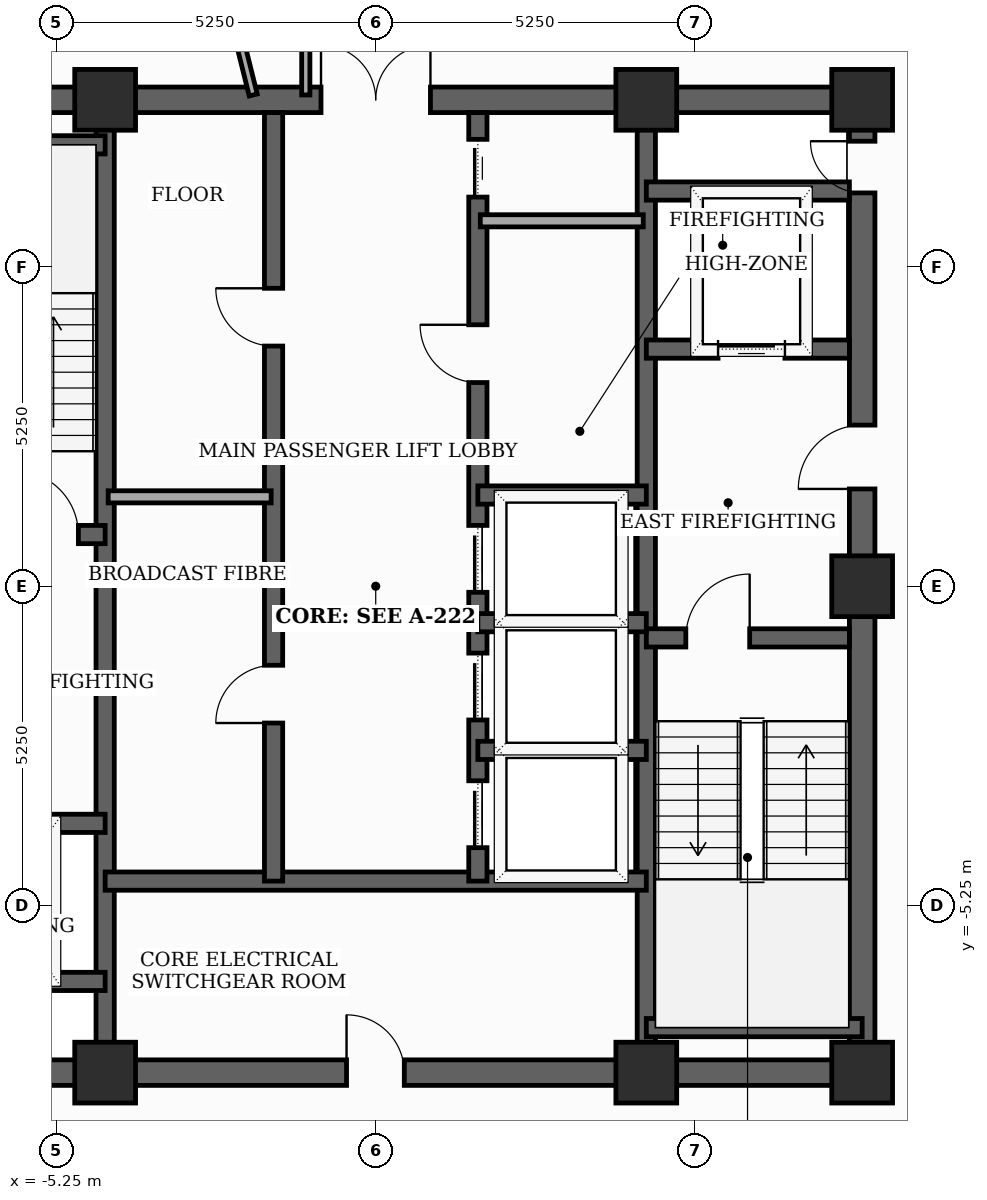
"""IFC4 building model, lengths in metres.
Left out: names, types, materials, properties, quantities, classifications, styles, units other than length and angle.
Written with IfcOpenShell. Run it as: python <this file> out.ifc"""

import sys

from ifc_helpers import new_model, si_unit, direction, frame, frame_2d, origin, origin_2d, place, context, subcontext, project, spatial, rectangle, extrude, element, fill, save


model = new_model("IFC4")
c1 = context("Model", 3, precision=1e-05, world=origin(), true_north=direction((0.0, 1.0)))
c2 = subcontext(c1, "Body", "Model", "MODEL_VIEW")
j1 = project(units=[si_unit("LENGTHUNIT", "METRE"), si_unit("PLANEANGLEUNIT", "RADIAN")], contexts=[c1])
p1 = place(None, origin())
s1 = spatial("IfcSite", under=j1, at=p1, CompositionType="ELEMENT")
p2 = place(p1, origin())
s2 = spatial("IfcBuilding", under=s1, at=p2, CompositionType="ELEMENT")
p3 = place(p2, frame((0.0, 0.0, 286.9)))
s3 = spatial("IfcBuildingStorey", under=s2, at=p3, CompositionType="ELEMENT", Elevation=286.9)
for number, where, z_axis, x_axis in (
    (1, (-4.45, -8.0, 0.0), (0.0, 0.0, 1.0), (1.0, 0.0, 0.0)),
    (2, (4.45, -8.0, 0.0), (0.0, 0.0, 1.0), (1.0, 0.0, 0.0)),
    (3, (8.0, -8.0, 0.0), (0.0, 0.0, 1.0), (1.0, 0.0, 0.0)),
    (4, (8.0, 0.0, 0.0), (0.0, 0.0, 1.0), (1.0, 0.0, 0.0)),
    (5, (8.0, 8.0, 0.0), (0.0, 0.0, 1.0), (1.0, 0.0, 0.0)),
    (6, (4.45, 8.0, 0.0), (0.0, 0.0, 1.0), (1.0, 0.0, 0.0)),
    (7, (-4.45, 8.0, 0.0), (0.0, 0.0, 1.0), (1.0, 0.0, 0.0)),
):
    element("IfcColumn", number, at=place(p3, frame(where, z_axis=z_axis, x_axis=x_axis)), inside=s3, PredefinedType="COLUMN", context=c2, shape_type="SweptSolid", body=[
        extrude(rectangle(XDim=1.0, YDim=1.0, at=origin_2d()), origin(), (0.0, 0.0, 1.0), 3.7),
    ])
p4 = place(p3, frame((8.0, -8.0, 0.0), z_axis=(0.0, 0.0, 1.0), x_axis=(0.0, 1.0, 0.0)))
e8 = element("IfcWall", 8, at=p4, inside=s3, PredefinedType="SHEAR", context=c2, shape_type="SweptSolid", body=[
    extrude(rectangle(XDim=16.0, YDim=0.42, at=frame_2d((8.0, 0.0))), origin(), (0.0, 0.0, 1.0), 3.5),
])
p5 = place(p4, frame((9.6, 0.0, 0.0)))
e9 = element("IfcOpeningElement", 9, at=p5, cuts=e8, PredefinedType="OPENING", context=c2, shape_type="SweptSolid", body=[
    extrude(rectangle(XDim=1.05, YDim=2.15, at=frame_2d((0.525, 1.075))), frame((0.0, 0.22, 0.0), z_axis=(0.0, -1.0, 0.0), x_axis=(1.0, 0.0, 0.0)), (0.0, 0.0, 1.0), 0.44),
])
p6 = place(p4, frame((14.469, 0.0, 0.0)))
e10 = element("IfcOpeningElement", 10, at=p6, cuts=e8, PredefinedType="OPENING", context=c2, shape_type="SweptSolid", body=[
    extrude(rectangle(XDim=0.85, YDim=2.02, at=frame_2d((0.425, 1.01))), frame((0.0, 0.22, 0.0), z_axis=(0.0, -1.0, 0.0), x_axis=(1.0, 0.0, 0.0)), (0.0, 0.0, 1.0), 0.44),
])
p7 = place(p3, frame((-8.0, -8.0, 0.0), z_axis=(0.0, 0.0, 1.0), x_axis=(1.0, 0.0, 0.0)))
e11 = element("IfcWall", 11, at=p7, inside=s3, PredefinedType="SHEAR", context=c2, shape_type="SweptSolid", body=[
    extrude(rectangle(XDim=16.0, YDim=0.42, at=frame_2d((8.0, 0.0))), origin(), (0.0, 0.0, 1.0), 3.5),
])
p8 = place(p7, frame((7.52, 0.0, 0.0)))
e12 = element("IfcOpeningElement", 12, at=p8, cuts=e11, PredefinedType="OPENING", context=c2, shape_type="SweptSolid", body=[
    extrude(rectangle(XDim=0.95, YDim=2.1, at=frame_2d((0.475, 1.05))), frame((0.0, 0.22, 0.0), z_axis=(0.0, -1.0, 0.0), x_axis=(1.0, 0.0, 0.0)), (0.0, 0.0, 1.0), 0.44),
])
p9 = place(p3, frame((-8.0, 8.0, 0.0), z_axis=(0.0, 0.0, 1.0), x_axis=(1.0, 0.0, 0.0)))
e13 = element("IfcWall", 13, at=p9, inside=s3, PredefinedType="SHEAR", context=c2, shape_type="SweptSolid", body=[
    extrude(rectangle(XDim=16.0, YDim=0.42, at=frame_2d((8.0, 0.0))), origin(), (0.0, 0.0, 1.0), 3.5),
])
p10 = place(p9, frame((7.1, 0.0, 0.0)))
e14 = element("IfcOpeningElement", 14, at=p10, cuts=e13, PredefinedType="OPENING", context=c2, shape_type="SweptSolid", body=[
    extrude(rectangle(XDim=1.8, YDim=2.15, at=frame_2d((0.9, 1.075))), frame((0.0, 0.22, 0.0), z_axis=(0.0, -1.0, 0.0), x_axis=(1.0, 0.0, 0.0)), (0.0, 0.0, 1.0), 0.44),
])
for number, where, z_axis, x_axis in (
    (15, (-4.45, -7.79, 0.0), (0.0, 0.0, 1.0), (0.0, 1.0, 0.0)),
    (16, (4.45, -7.79, 0.0), (0.0, 0.0, 1.0), (0.0, 1.0, 0.0)),
):
    element("IfcWall", number, at=place(p3, frame(where, z_axis=z_axis, x_axis=x_axis)), inside=s3, PredefinedType="SHEAR", context=c2, shape_type="SweptSolid", body=[
        extrude(rectangle(XDim=15.58, YDim=0.3, at=frame_2d((7.79, 0.0))), origin(), (0.0, 0.0, 1.0), 3.5),
    ])
p11 = place(p3, frame((-7.79, 0.85, 0.0), z_axis=(0.0, 0.0, 1.0), x_axis=(1.0, 0.0, 0.0)))
e17 = element("IfcWall", 17, at=p11, inside=s3, PredefinedType="SHEAR", context=c2, shape_type="SweptSolid", body=[
    extrude(rectangle(XDim=3.34, YDim=0.3, at=frame_2d((1.67, 0.0))), origin(), (0.0, 0.0, 1.0), 3.5),
])
p12 = place(p11, frame((1.85, 0.0, 0.0)))
e18 = element("IfcOpeningElement", 18, at=p12, cuts=e17, PredefinedType="OPENING", context=c2, shape_type="SweptSolid", body=[
    extrude(rectangle(XDim=1.05, YDim=2.15, at=frame_2d((0.525, 1.075))), frame((0.0, 0.16, 0.0), z_axis=(0.0, -1.0, 0.0), x_axis=(1.0, 0.0, 0.0)), (0.0, 0.0, 1.0), 0.32),
])
p13 = place(p3, frame((-7.79, 7.26, 0.0), z_axis=(0.0, 0.0, 1.0), x_axis=(1.0, 0.0, 0.0)))
e19 = element("IfcWall", 19, at=p13, inside=s3, PredefinedType="SHEAR", context=c2, shape_type="SweptSolid", body=[
    extrude(rectangle(XDim=3.34, YDim=0.3, at=frame_2d((1.67, 0.0))), origin(), (0.0, 0.0, 1.0), 3.5),
])
p14 = place(p3, frame((4.45, -0.85, 0.0), z_axis=(0.0, 0.0, 1.0), x_axis=(1.0, 0.0, 0.0)))
e20 = element("IfcWall", 20, at=p14, inside=s3, PredefinedType="SHEAR", context=c2, shape_type="SweptSolid", body=[
    extrude(rectangle(XDim=3.34, YDim=0.3, at=frame_2d((1.67, 0.0))), origin(), (0.0, 0.0, 1.0), 3.5),
])
p15 = place(p14, frame((0.65, 0.0, 0.0)))
e21 = element("IfcOpeningElement", 21, at=p15, cuts=e20, PredefinedType="OPENING", context=c2, shape_type="SweptSolid", body=[
    extrude(rectangle(XDim=1.05, YDim=2.15, at=frame_2d((0.525, 1.075))), frame((0.0, 0.16, 0.0), z_axis=(0.0, -1.0, 0.0), x_axis=(1.0, 0.0, 0.0)), (0.0, 0.0, 1.0), 0.32),
])
p16 = place(p3, frame((4.45, -7.26, 0.0), z_axis=(0.0, 0.0, 1.0), x_axis=(1.0, 0.0, 0.0)))
e22 = element("IfcWall", 22, at=p16, inside=s3, PredefinedType="SHEAR", context=c2, shape_type="SweptSolid", body=[
    extrude(rectangle(XDim=3.55, YDim=0.3, at=frame_2d((1.775, 0.0))), origin(), (0.0, 0.0, 1.0), 3.5),
])
p17 = place(p3, frame((-7.79, -3.9, 0.0), z_axis=(0.0, 0.0, 1.0), x_axis=(1.0, 0.0, 0.0)))
e23 = element("IfcWall", 23, at=p17, inside=s3, PredefinedType="SHEAR", context=c2, shape_type="SweptSolid", body=[
    extrude(rectangle(XDim=3.34, YDim=0.3, at=frame_2d((1.67, 0.0))), origin(), (0.0, 0.0, 1.0), 3.5),
])
p18 = place(p17, frame((1.27, 0.0, 0.0)))
e24 = element("IfcOpeningElement", 24, at=p18, cuts=e23, PredefinedType="OPENING", context=c2, shape_type="SweptSolid", body=[
    extrude(rectangle(XDim=1.1, YDim=2.1, at=frame_2d((0.55, 1.05))), frame((0.0, 0.16, 0.0), z_axis=(0.0, -1.0, 0.0), x_axis=(1.0, 0.0, 0.0)), (0.0, 0.0, 1.0), 0.32),
])
p19 = place(p3, frame((-7.79, -6.5, 0.0), z_axis=(0.0, 0.0, 1.0), x_axis=(1.0, 0.0, 0.0)))
e25 = element("IfcWall", 25, at=p19, inside=s3, PredefinedType="SHEAR", context=c2, shape_type="SweptSolid", body=[
    extrude(rectangle(XDim=3.34, YDim=0.3, at=frame_2d((1.67, 0.0))), origin(), (0.0, 0.0, 1.0), 3.5),
])
p20 = place(p3, frame((4.45, 3.9, 0.0), z_axis=(0.0, 0.0, 1.0), x_axis=(1.0, 0.0, 0.0)))
e26 = element("IfcWall", 26, at=p20, inside=s3, PredefinedType="SHEAR", context=c2, shape_type="SweptSolid", body=[
    extrude(rectangle(XDim=3.34, YDim=0.3, at=frame_2d((1.67, 0.0))), origin(), (0.0, 0.0, 1.0), 3.5),
])
p21 = place(p20, frame((1.18, 0.0, 0.0)))
e27 = element("IfcOpeningElement", 27, at=p21, cuts=e26, PredefinedType="OPENING", context=c2, shape_type="SweptSolid", body=[
    extrude(rectangle(XDim=1.1, YDim=2.1, at=frame_2d((0.55, 1.05))), frame((0.0, 0.16, 0.0), z_axis=(0.0, -1.0, 0.0), x_axis=(1.0, 0.0, 0.0)), (0.0, 0.0, 1.0), 0.32),
])
p22 = place(p3, frame((4.45, 6.5, 0.0), z_axis=(0.0, 0.0, 1.0), x_axis=(1.0, 0.0, 0.0)))
e28 = element("IfcWall", 28, at=p22, inside=s3, PredefinedType="SHEAR", context=c2, shape_type="SweptSolid", body=[
    extrude(rectangle(XDim=3.34, YDim=0.3, at=frame_2d((1.67, 0.0))), origin(), (0.0, 0.0, 1.0), 3.5),
])
p23 = place(p3, frame((-4.45, -4.85, 0.0), z_axis=(0.0, 0.0, 1.0), x_axis=(1.0, 0.0, 0.0)))
e29 = element("IfcWall", 29, at=p23, inside=s3, PredefinedType="SHEAR", context=c2, shape_type="SweptSolid", body=[
    extrude(rectangle(XDim=8.9, YDim=0.3, at=frame_2d((4.45, 0.0))), origin(), (0.0, 0.0, 1.0), 3.5),
])
p24 = place(p3, frame((-1.68, -4.85, 0.0), z_axis=(0.0, 0.0, 1.0), x_axis=(0.0, 1.0, 0.0)))
e30 = element("IfcWall", 30, at=p24, inside=s3, PredefinedType="SHEAR", context=c2, shape_type="SweptSolid", body=[
    extrude(rectangle(XDim=12.64, YDim=0.3, at=frame_2d((6.32, 0.0))), origin(), (0.0, 0.0, 1.0), 3.5),
])
p25 = place(p24, frame((2.6, 0.0, 0.0)))
e31 = element("IfcOpeningElement", 31, at=p25, cuts=e30, PredefinedType="OPENING", context=c2, shape_type="SweptSolid", body=[
    extrude(rectangle(XDim=0.95, YDim=2.1, at=frame_2d((0.475, 1.05))), frame((0.0, 0.16, 0.0), z_axis=(0.0, -1.0, 0.0), x_axis=(1.0, 0.0, 0.0)), (0.0, 0.0, 1.0), 0.32),
])
p26 = place(p24, frame((8.8, 0.0, 0.0)))
e32 = element("IfcOpeningElement", 32, at=p26, cuts=e30, PredefinedType="OPENING", context=c2, shape_type="SweptSolid", body=[
    extrude(rectangle(XDim=0.95, YDim=2.1, at=frame_2d((0.475, 1.05))), frame((0.0, 0.16, 0.0), z_axis=(0.0, -1.0, 0.0), x_axis=(1.0, 0.0, 0.0)), (0.0, 0.0, 1.0), 0.32),
])
p27 = place(p3, frame((1.68, -4.85, 0.0), z_axis=(0.0, 0.0, 1.0), x_axis=(0.0, 1.0, 0.0)))
e33 = element("IfcWall", 33, at=p27, inside=s3, PredefinedType="SHEAR", context=c2, shape_type="SweptSolid", body=[
    extrude(rectangle(XDim=12.64, YDim=0.3, at=frame_2d((6.32, 0.0))), origin(), (0.0, 0.0, 1.0), 3.5),
])
p28 = place(p27, frame((0.55, 0.0, 0.0)))
e34 = element("IfcOpeningElement", 34, at=p28, cuts=e33, PredefinedType="OPENING", context=c2, shape_type="SweptSolid", body=[
    extrude(rectangle(XDim=1.1, YDim=2.1, at=frame_2d((0.55, 1.05))), frame((0.0, 0.16, 0.0), z_axis=(0.0, -1.0, 0.0), x_axis=(1.0, 0.0, 0.0)), (0.0, 0.0, 1.0), 0.32),
])
p29 = place(p27, frame((2.65, 0.0, 0.0)))
e35 = element("IfcOpeningElement", 35, at=p29, cuts=e33, PredefinedType="OPENING", context=c2, shape_type="SweptSolid", body=[
    extrude(rectangle(XDim=1.1, YDim=2.1, at=frame_2d((0.55, 1.05))), frame((0.0, 0.16, 0.0), z_axis=(0.0, -1.0, 0.0), x_axis=(1.0, 0.0, 0.0)), (0.0, 0.0, 1.0), 0.32),
])
p30 = place(p27, frame((4.75, 0.0, 0.0)))
e36 = element("IfcOpeningElement", 36, at=p30, cuts=e33, PredefinedType="OPENING", context=c2, shape_type="SweptSolid", body=[
    extrude(rectangle(XDim=1.1, YDim=2.1, at=frame_2d((0.55, 1.05))), frame((0.0, 0.16, 0.0), z_axis=(0.0, -1.0, 0.0), x_axis=(1.0, 0.0, 0.0)), (0.0, 0.0, 1.0), 0.32),
])
p31 = place(p27, frame((8.2, 0.0, 0.0)))
e37 = element("IfcOpeningElement", 37, at=p31, cuts=e33, PredefinedType="OPENING", context=c2, shape_type="SweptSolid", body=[
    extrude(rectangle(XDim=0.95, YDim=2.1, at=frame_2d((0.475, 1.05))), frame((0.0, 0.16, 0.0), z_axis=(0.0, -1.0, 0.0), x_axis=(1.0, 0.0, 0.0)), (0.0, 0.0, 1.0), 0.32),
])
p32 = place(p27, frame((11.25, 0.0, 0.0)))
e38 = element("IfcOpeningElement", 38, at=p32, cuts=e33, PredefinedType="OPENING", context=c2, shape_type="SweptSolid", body=[
    extrude(rectangle(XDim=0.95, YDim=2.1, at=frame_2d((0.475, 1.05))), frame((0.0, 0.16, 0.0), z_axis=(0.0, -1.0, 0.0), x_axis=(1.0, 0.0, 0.0)), (0.0, 0.0, 1.0), 0.32),
])
for number, where, z_axis, x_axis in (
    (39, (1.68, 1.5, 0.0), (0.0, 0.0, 1.0), (1.0, 0.0, 0.0)),
    (40, (1.68, -2.7, 0.0), (0.0, 0.0, 1.0), (1.0, 0.0, 0.0)),
    (41, (1.68, -0.6, 0.0), (0.0, 0.0, 1.0), (1.0, 0.0, 0.0)),
):
    element("IfcWall", number, at=place(p3, frame(where, z_axis=z_axis, x_axis=x_axis)), inside=s3, PredefinedType="SHEAR", context=c2, shape_type="SweptSolid", body=[
        extrude(rectangle(XDim=2.77, YDim=0.3, at=frame_2d((1.385, 0.0))), origin(), (0.0, 0.0, 1.0), 3.5),
    ])
for number, where, z_axis, x_axis in (
    (42, (-4.4, 1.47, 0.0), (0.0, 0.0, 1.0), (1.0, 0.0, 0.0)),
    (43, (1.72, 6.01, 0.0), (0.0, 0.0, 1.0), (1.0, 0.0, 0.0)),
):
    element("IfcWall", number, at=place(p3, frame(where, z_axis=z_axis, x_axis=x_axis)), inside=s3, PredefinedType="SOLIDWALL", context=c2, shape_type="SweptSolid", body=[
        extrude(rectangle(XDim=2.68, YDim=0.2, at=frame_2d((1.34, 0.0))), origin(), (0.0, 0.0, 1.0), 3.5),
    ])
p33 = place(p3, frame((-1.15, 10.65, 0.0), z_axis=(0.0, 0.0, 1.0), x_axis=(0.0, -1.0, 0.0)))
e44 = element("IfcWall", 44, at=p33, inside=s3, PredefinedType="PARTITIONING", context=c2, shape_type="SweptSolid", body=[
    extrude(rectangle(XDim=2.57, YDim=0.135, at=frame_2d((1.285, 0.0))), origin(), (0.0, 0.0, 1.0), 2.885),
])
p34 = place(p3, frame((-3.803, 15.255, 0.0), z_axis=(0.0, 0.0, 1.0), x_axis=(0.241851911951, -0.970313172479, 0.0)))
e45 = element("IfcWall", 45, at=p34, inside=s3, PredefinedType="PARTITIONING", context=c2, shape_type="SweptSolid", body=[
    extrude(rectangle(XDim=7.394, YDim=0.135, at=frame_2d((3.697, 0.0))), origin(), (0.0, 0.0, 1.0), 2.885),
])
p35 = place(p5, origin())
e46 = element("IfcDoor", 46, at=p35, inside=s3, OperationType="SINGLE_SWING_LEFT", PredefinedType="DOOR", context=c2, shape_type="SweptSolid", body=[
    extrude(rectangle(XDim=1.05, YDim=2.15, at=frame_2d((0.525, 1.075))), frame((0.0, 0.025, 0.0), z_axis=(0.0, -1.0, 0.0), x_axis=(1.0, 0.0, 0.0)), (0.0, 0.0, 1.0), 0.05),
])
fill(e9, e46)
p36 = place(p6, origin())
e47 = element("IfcDoor", 47, at=p36, inside=s3, OperationType="SINGLE_SWING_RIGHT", PredefinedType="TRAPDOOR", context=c2, shape_type="SweptSolid", body=[
    extrude(rectangle(XDim=0.85, YDim=2.02, at=frame_2d((0.425, 1.01))), frame((0.0, 0.025, 0.0), z_axis=(0.0, -1.0, 0.0), x_axis=(1.0, 0.0, 0.0)), (0.0, 0.0, 1.0), 0.05),
])
fill(e10, e47)
p37 = place(p8, origin())
e48 = element("IfcDoor", 48, at=p37, inside=s3, OperationType="SINGLE_SWING_LEFT", PredefinedType="DOOR", context=c2, shape_type="SweptSolid", body=[
    extrude(rectangle(XDim=0.95, YDim=2.1, at=frame_2d((0.475, 1.05))), frame((0.0, 0.025, 0.0), z_axis=(0.0, -1.0, 0.0), x_axis=(1.0, 0.0, 0.0)), (0.0, 0.0, 1.0), 0.05),
])
fill(e12, e48)
p38 = place(p10, origin())
e49 = element("IfcDoor", 49, at=p38, inside=s3, OperationType="DOUBLE_DOOR_SINGLE_SWING", PredefinedType="DOOR", context=c2, shape_type="SweptSolid", body=[
    extrude(rectangle(XDim=1.8, YDim=2.15, at=frame_2d((0.9, 1.075))), frame((0.0, 0.025, 0.0), z_axis=(0.0, -1.0, 0.0), x_axis=(1.0, 0.0, 0.0)), (0.0, 0.0, 1.0), 0.05),
])
fill(e14, e49)
p39 = place(p12, origin())
e50 = element("IfcDoor", 50, at=p39, inside=s3, OperationType="SINGLE_SWING_LEFT", PredefinedType="DOOR", context=c2, shape_type="SweptSolid", body=[
    extrude(rectangle(XDim=1.05, YDim=2.15, at=frame_2d((0.525, 1.075))), frame((0.0, 0.025, 0.0), z_axis=(0.0, -1.0, 0.0), x_axis=(1.0, 0.0, 0.0)), (0.0, 0.0, 1.0), 0.05),
])
fill(e18, e50)
p40 = place(p15, origin())
e51 = element("IfcDoor", 51, at=p40, inside=s3, OperationType="SINGLE_SWING_RIGHT", PredefinedType="DOOR", context=c2, shape_type="SweptSolid", body=[
    extrude(rectangle(XDim=1.05, YDim=2.15, at=frame_2d((0.525, 1.075))), frame((0.0, 0.025, 0.0), z_axis=(0.0, -1.0, 0.0), x_axis=(1.0, 0.0, 0.0)), (0.0, 0.0, 1.0), 0.05),
])
fill(e21, e51)
p41 = place(p21, origin())
e52 = element("IfcDoor", 52, at=p41, inside=s3, OperationType="SLIDING_TO_LEFT", PredefinedType="DOOR", context=c2, shape_type="SweptSolid", body=[
    extrude(rectangle(XDim=1.1, YDim=2.1, at=frame_2d((0.55, 1.05))), frame((0.0, 0.025, 0.0), z_axis=(0.0, -1.0, 0.0), x_axis=(1.0, 0.0, 0.0)), (0.0, 0.0, 1.0), 0.05),
])
fill(e27, e52)
p42 = place(p25, origin())
e53 = element("IfcDoor", 53, at=p42, inside=s3, OperationType="SINGLE_SWING_LEFT", PredefinedType="DOOR", context=c2, shape_type="SweptSolid", body=[
    extrude(rectangle(XDim=0.95, YDim=2.1, at=frame_2d((0.475, 1.05))), frame((0.0, 0.025, 0.0), z_axis=(0.0, -1.0, 0.0), x_axis=(1.0, 0.0, 0.0)), (0.0, 0.0, 1.0), 0.05),
])
fill(e31, e53)
p43 = place(p26, origin())
e54 = element("IfcDoor", 54, at=p43, inside=s3, OperationType="SINGLE_SWING_RIGHT", PredefinedType="DOOR", context=c2, shape_type="SweptSolid", body=[
    extrude(rectangle(XDim=0.95, YDim=2.1, at=frame_2d((0.475, 1.05))), frame((0.0, 0.025, 0.0), z_axis=(0.0, -1.0, 0.0), x_axis=(1.0, 0.0, 0.0)), (0.0, 0.0, 1.0), 0.05),
])
fill(e32, e54)
p44 = place(p28, origin())
e55 = element("IfcDoor", 55, at=p44, inside=s3, OperationType="SLIDING_TO_LEFT", PredefinedType="DOOR", context=c2, shape_type="SweptSolid", body=[
    extrude(rectangle(XDim=1.1, YDim=2.1, at=frame_2d((0.55, 1.05))), frame((0.0, 0.025, 0.0), z_axis=(0.0, -1.0, 0.0), x_axis=(1.0, 0.0, 0.0)), (0.0, 0.0, 1.0), 0.05),
])
fill(e34, e55)
p45 = place(p29, origin())
e56 = element("IfcDoor", 56, at=p45, inside=s3, OperationType="SLIDING_TO_LEFT", PredefinedType="DOOR", context=c2, shape_type="SweptSolid", body=[
    extrude(rectangle(XDim=1.1, YDim=2.1, at=frame_2d((0.55, 1.05))), frame((0.0, 0.025, 0.0), z_axis=(0.0, -1.0, 0.0), x_axis=(1.0, 0.0, 0.0)), (0.0, 0.0, 1.0), 0.05),
])
fill(e35, e56)
p46 = place(p30, origin())
e57 = element("IfcDoor", 57, at=p46, inside=s3, OperationType="SLIDING_TO_LEFT", PredefinedType="DOOR", context=c2, shape_type="SweptSolid", body=[
    extrude(rectangle(XDim=1.1, YDim=2.1, at=frame_2d((0.55, 1.05))), frame((0.0, 0.025, 0.0), z_axis=(0.0, -1.0, 0.0), x_axis=(1.0, 0.0, 0.0)), (0.0, 0.0, 1.0), 0.05),
])
fill(e36, e57)
p47 = place(p31, origin())
e58 = element("IfcDoor", 58, at=p47, inside=s3, OperationType="SINGLE_SWING_RIGHT", PredefinedType="DOOR", context=c2, shape_type="SweptSolid", body=[
    extrude(rectangle(XDim=0.95, YDim=2.1, at=frame_2d((0.475, 1.05))), frame((0.0, 0.025, 0.0), z_axis=(0.0, -1.0, 0.0), x_axis=(1.0, 0.0, 0.0)), (0.0, 0.0, 1.0), 0.05),
])
fill(e37, e58)
p48 = place(p32, origin())
e59 = element("IfcDoor", 59, at=p48, inside=s3, OperationType="SLIDING_TO_LEFT", PredefinedType="DOOR", context=c2, shape_type="SweptSolid", body=[
    extrude(rectangle(XDim=0.95, YDim=2.1, at=frame_2d((0.475, 1.05))), frame((0.0, 0.025, 0.0), z_axis=(0.0, -1.0, 0.0), x_axis=(1.0, 0.0, 0.0)), (0.0, 0.0, 1.0), 0.05),
])
fill(e38, e59)
save(model, sys.argv[1])
